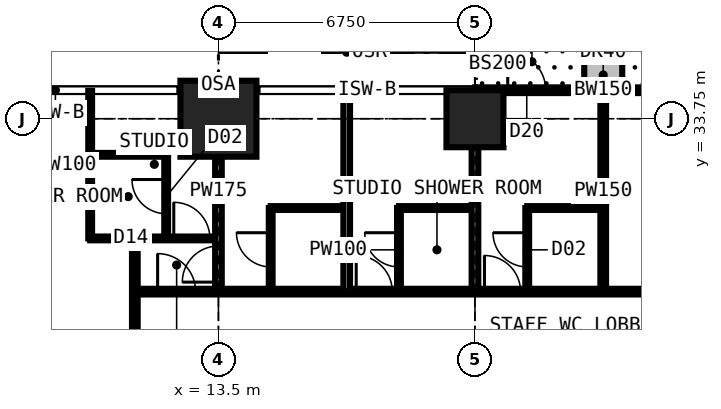
"""IFC4 building model, lengths in metres.
Left out: names, types, materials, properties, quantities, classifications, styles, units other than length and angle.
Written with IfcOpenShell. Run it as: python <this file> out.ifc"""

import sys

from ifc_helpers import new_model, si_unit, direction, frame, frame_2d, origin, origin_2d, place, context, subcontext, project, spatial, rectangle, extrude, element, fill, save


model = new_model("IFC4")
c1 = context("Model", 3, precision=1e-05, world=origin(), true_north=direction((0.0, 1.0)))
c2 = subcontext(c1, "Body", "Model", "MODEL_VIEW")
j1 = project(units=[si_unit("LENGTHUNIT", "METRE"), si_unit("PLANEANGLEUNIT", "RADIAN")], contexts=[c1])
p1 = place(None, origin())
s1 = spatial("IfcSite", under=j1, at=p1, CompositionType="ELEMENT")
p2 = place(p1, origin())
s2 = spatial("IfcBuilding", under=s1, at=p2, CompositionType="ELEMENT")
p3 = place(p2, frame((0.0, 0.0, 134.1)))
s3 = spatial("IfcBuildingStorey", under=s2, at=p3, CompositionType="ELEMENT", Elevation=134.1)
p4 = place(p3, frame((13.5, 33.75, 0.0), z_axis=(0.0, 0.0, 1.0), x_axis=(1.0, 0.0, 0.0)))
e1 = element("IfcColumn", 1, at=p4, inside=s3, PredefinedType="COLUMN", context=c2, shape_type="SweptSolid", body=[
    extrude(rectangle(XDim=2.0, YDim=2.0, at=origin_2d()), origin(), (0.0, 0.0, 1.0), 3.6),
])
p5 = place(p3, frame((20.25, 33.75, 0.0), z_axis=(0.0, 0.0, 1.0), x_axis=(1.0, 0.0, 0.0)))
e2 = element("IfcColumn", 2, at=p5, inside=s3, PredefinedType="COLUMN", context=c2, shape_type="SweptSolid", body=[
    extrude(rectangle(XDim=1.5, YDim=1.5, at=origin_2d()), origin(), (0.0, 0.0, 1.0), 3.6),
])
p6 = place(p3, frame((20.25, 34.5, 0.0), z_axis=(0.0, 0.0, 1.0), x_axis=(1.0, 0.0, 0.0)))
e3 = element("IfcWall", 3, at=p6, inside=s3, PredefinedType="SOLIDWALL", context=c2, shape_type="SweptSolid", body=[
    extrude(rectangle(XDim=6.75, YDim=0.15, at=frame_2d((3.375, 0.0))), origin(), (0.0, 0.0, 1.0), 3.3),
])
p7 = place(p6, frame((0.863, 0.0, 0.0)))
e4 = element("IfcOpeningElement", 4, at=p7, cuts=e3, PredefinedType="OPENING", context=c2, shape_type="SweptSolid", body=[
    extrude(rectangle(XDim=1.0, YDim=2.2, at=frame_2d((0.5, 1.1))), frame((0.0, 0.085, 0.0), z_axis=(0.0, -1.0, 0.0), x_axis=(1.0, 0.0, 0.0)), (0.0, 0.0, 1.0), 0.17),
])
p8 = place(p6, frame((1.975, 0.0, 0.9)))
e5 = element("IfcOpeningElement", 5, at=p8, cuts=e3, PredefinedType="OPENING", context=c2, shape_type="SweptSolid", body=[
    extrude(rectangle(XDim=1.2, YDim=1.8, at=frame_2d((0.6, 0.9))), frame((0.0, 0.085, 0.0), z_axis=(0.0, -1.0, 0.0), x_axis=(1.0, 0.0, 0.0)), (0.0, 0.0, 1.0), 0.17),
])
p9 = place(p6, frame((4.621, 0.0, 0.0)))
e6 = element("IfcOpeningElement", 6, at=p9, cuts=e3, PredefinedType="OPENING", context=c2, shape_type="SweptSolid", body=[
    extrude(rectangle(XDim=1.0, YDim=2.2, at=frame_2d((0.5, 1.1))), frame((0.0, 0.085, 0.0), z_axis=(0.0, -1.0, 0.0), x_axis=(1.0, 0.0, 0.0)), (0.0, 0.0, 1.0), 0.17),
])
p10 = place(p6, frame((3.592, 0.0, 0.9)))
e7 = element("IfcOpeningElement", 7, at=p10, cuts=e3, PredefinedType="OPENING", context=c2, shape_type="SweptSolid", body=[
    extrude(rectangle(XDim=0.9, YDim=1.8, at=frame_2d((0.45, 0.9))), frame((0.0, 0.085, 0.0), z_axis=(0.0, -1.0, 0.0), x_axis=(1.0, 0.0, 0.0)), (0.0, 0.0, 1.0), 0.17),
])
p11 = place(p3, frame((23.625, 34.6, 0.0), z_axis=(0.0, 0.0, 1.0), x_axis=(0.0, 1.0, 0.0)))
e8 = element("IfcWall", 8, at=p11, inside=s3, PredefinedType="USERDEFINED", context=c2, shape_type="SweptSolid", body=[
    extrude(rectangle(XDim=2.2, YDim=1.0, at=frame_2d((1.1, 0.0))), origin(), (0.0, 0.0, 1.0), 0.9),
])
p12 = place(p3, frame((10.125, 30.6, 0.0), z_axis=(0.0, 0.0, 1.0), x_axis=(0.0, 1.0, 0.0)))
e9 = element("IfcWall", 9, at=p12, inside=s3, PredefinedType="PARTITIONING", context=c2, shape_type="SweptSolid", body=[
    extrude(rectangle(XDim=3.884, YDim=0.1, at=frame_2d((1.942, 0.0))), origin(), (0.0, 0.0, 1.0), 3.3),
])
p13 = place(p3, frame((10.125, 30.6, 0.0), z_axis=(0.0, 0.0, 1.0), x_axis=(1.0, 0.0, 0.0)))
e10 = element("IfcWall", 10, at=p13, inside=s3, PredefinedType="PARTITIONING", context=c2, shape_type="SweptSolid", body=[
    extrude(rectangle(XDim=3.375, YDim=0.1, at=frame_2d((1.688, 0.0))), origin(), (0.0, 0.0, 1.0), 3.3),
])
p14 = place(p13, frame((2.2, 0.0, 0.0)))
e11 = element("IfcOpeningElement", 11, at=p14, cuts=e10, PredefinedType="OPENING", context=c2, shape_type="SweptSolid", body=[
    extrude(rectangle(XDim=0.95, YDim=2.2, at=frame_2d((0.475, 1.1))), frame((0.0, 0.06, 0.0), z_axis=(0.0, -1.0, 0.0), x_axis=(1.0, 0.0, 0.0)), (0.0, 0.0, 1.0), 0.12),
])
p15 = place(p3, frame((10.125, 32.8, 0.0), z_axis=(0.0, 0.0, 1.0), x_axis=(1.0, 0.0, 0.0)))
e12 = element("IfcWall", 12, at=p15, inside=s3, PredefinedType="PARTITIONING", context=c2, shape_type="SweptSolid", body=[
    extrude(rectangle(XDim=2.0, YDim=0.1, at=frame_2d((1.0, 0.0))), origin(), (0.0, 0.0, 1.0), 3.3),
])
p16 = place(p3, frame((11.3, 11.3, 0.0), z_axis=(0.0, 0.0, 1.0), x_axis=(0.0, 1.0, 0.0)))
e13 = element("IfcWall", 13, at=p16, inside=s3, PredefinedType="PARTITIONING", context=c2, shape_type="SweptSolid", body=[
    extrude(rectangle(XDim=19.3, YDim=0.15, at=frame_2d((9.65, 0.0))), origin(), (0.0, 0.0, 1.0), 3.3),
])
p17 = place(p16, frame((13.525, 0.0, 0.0)))
e14 = element("IfcOpeningElement", 14, at=p17, cuts=e13, PredefinedType="OPENING", context=c2, shape_type="SweptSolid", body=[
    extrude(rectangle(XDim=1.0, YDim=2.2, at=frame_2d((0.5, 1.1))), frame((0.0, 0.085, 0.0), z_axis=(0.0, -1.0, 0.0), x_axis=(1.0, 0.0, 0.0)), (0.0, 0.0, 1.0), 0.17),
])
p18 = place(p16, frame((10.438, 0.0, 0.0)))
e15 = element("IfcOpeningElement", 15, at=p18, cuts=e13, PredefinedType="OPENING", context=c2, shape_type="SweptSolid", body=[
    extrude(rectangle(XDim=1.0, YDim=2.2, at=frame_2d((0.5, 1.1))), frame((0.0, 0.085, 0.0), z_axis=(0.0, -1.0, 0.0), x_axis=(1.0, 0.0, 0.0)), (0.0, 0.0, 1.0), 0.17),
])
p19 = place(p3, frame((11.3, 29.2, 0.0), z_axis=(0.0, 0.0, 1.0), x_axis=(1.0, 0.0, 0.0)))
e16 = element("IfcWall", 16, at=p19, inside=s3, PredefinedType="PARTITIONING", context=c2, shape_type="SweptSolid", body=[
    extrude(rectangle(XDim=19.075, YDim=0.15, at=frame_2d((9.538, 0.0))), origin(), (0.0, 0.0, 1.0), 3.3),
])
p20 = place(p19, frame((5.825, 0.0, 0.0)))
e17 = element("IfcOpeningElement", 17, at=p20, cuts=e16, PredefinedType="OPENING", context=c2, shape_type="SweptSolid", body=[
    extrude(rectangle(XDim=0.95, YDim=2.2, at=frame_2d((0.475, 1.1))), frame((0.0, 0.085, 0.0), z_axis=(0.0, -1.0, 0.0), x_axis=(1.0, 0.0, 0.0)), (0.0, 0.0, 1.0), 0.17),
])
p21 = place(p19, frame((9.2, 0.0, 0.0)))
e18 = element("IfcOpeningElement", 18, at=p21, cuts=e16, PredefinedType="OPENING", context=c2, shape_type="SweptSolid", body=[
    extrude(rectangle(XDim=0.95, YDim=2.2, at=frame_2d((0.475, 1.1))), frame((0.0, 0.085, 0.0), z_axis=(0.0, -1.0, 0.0), x_axis=(1.0, 0.0, 0.0)), (0.0, 0.0, 1.0), 0.17),
])
p22 = place(p19, frame((0.6, 0.0, 0.0)))
e19 = element("IfcOpeningElement", 19, at=p22, cuts=e16, PredefinedType="OPENING", context=c2, shape_type="SweptSolid", body=[
    extrude(rectangle(XDim=1.0, YDim=2.2, at=frame_2d((0.5, 1.1))), frame((0.0, 0.085, 0.0), z_axis=(0.0, -1.0, 0.0), x_axis=(1.0, 0.0, 0.0)), (0.0, 0.0, 1.0), 0.17),
])
p23 = place(p3, frame((12.125, 30.6, 0.0), z_axis=(0.0, 0.0, 1.0), x_axis=(0.0, 1.0, 0.0)))
e20 = element("IfcWall", 20, at=p23, inside=s3, PredefinedType="PARTITIONING", context=c2, shape_type="SweptSolid", body=[
    extrude(rectangle(XDim=2.2, YDim=0.1, at=frame_2d((1.1, 0.0))), origin(), (0.0, 0.0, 1.0), 3.3),
])
p24 = place(p23, frame((0.65, 0.0, 0.0)))
e21 = element("IfcOpeningElement", 21, at=p24, cuts=e20, PredefinedType="OPENING", context=c2, shape_type="SweptSolid", body=[
    extrude(rectangle(XDim=0.9, YDim=2.2, at=frame_2d((0.45, 1.1))), frame((0.0, 0.06, 0.0), z_axis=(0.0, -1.0, 0.0), x_axis=(1.0, 0.0, 0.0)), (0.0, 0.0, 1.0), 0.12),
])
p25 = place(p3, frame((13.5, 29.2, 0.0), z_axis=(0.0, 0.0, 1.0), x_axis=(0.0, 1.0, 0.0)))
e22 = element("IfcWall", 22, at=p25, inside=s3, PredefinedType="PARTITIONING", context=c2, shape_type="SweptSolid", body=[
    extrude(rectangle(XDim=5.284, YDim=0.175, at=frame_2d((2.642, 0.0))), origin(), (0.0, 0.0, 1.0), 2.731),
])
p26 = place(p25, frame((0.25, 0.0, 0.0)))
e23 = element("IfcOpeningElement", 23, at=p26, cuts=e22, PredefinedType="OPENING", context=c2, shape_type="SweptSolid", body=[
    extrude(rectangle(XDim=0.95, YDim=2.2, at=frame_2d((0.475, 1.1))), frame((0.0, 0.097, 0.0), z_axis=(0.0, -1.0, 0.0), x_axis=(1.0, 0.0, 0.0)), (0.0, 0.0, 1.0), 0.195),
])
p27 = place(p3, frame((14.875, 29.2, 0.0), z_axis=(0.0, 0.0, 1.0), x_axis=(0.0, 1.0, 0.0)))
e24 = element("IfcWall", 24, at=p27, inside=s3, PredefinedType="PARTITIONING", context=c2, shape_type="SweptSolid", body=[
    extrude(rectangle(XDim=2.2, YDim=0.1, at=frame_2d((1.1, 0.0))), origin(), (0.0, 0.0, 1.0), 3.3),
])
p28 = place(p27, frame((0.65, 0.0, 0.0)))
e25 = element("IfcOpeningElement", 25, at=p28, cuts=e24, PredefinedType="OPENING", context=c2, shape_type="SweptSolid", body=[
    extrude(rectangle(XDim=0.9, YDim=2.2, at=frame_2d((0.45, 1.1))), frame((0.0, 0.06, 0.0), z_axis=(0.0, -1.0, 0.0), x_axis=(1.0, 0.0, 0.0)), (0.0, 0.0, 1.0), 0.12),
])
p29 = place(p3, frame((14.875, 31.4, 0.0), z_axis=(0.0, 0.0, 1.0), x_axis=(1.0, 0.0, 0.0)))
e26 = element("IfcWall", 26, at=p29, inside=s3, PredefinedType="PARTITIONING", context=c2, shape_type="SweptSolid", body=[
    extrude(rectangle(XDim=2.0, YDim=0.1, at=frame_2d((1.0, 0.0))), origin(), (0.0, 0.0, 1.0), 3.3),
])
p30 = place(p3, frame((16.875, 29.2, 0.0), z_axis=(0.0, 0.0, 1.0), x_axis=(0.0, 1.0, 0.0)))
e27 = element("IfcWall", 27, at=p30, inside=s3, PredefinedType="PARTITIONING", context=c2, shape_type="SweptSolid", body=[
    extrude(rectangle(XDim=5.284, YDim=0.175, at=frame_2d((2.642, 0.0))), origin(), (0.0, 0.0, 1.0), 3.3),
])
p31 = place(p3, frame((18.25, 29.2, 0.0), z_axis=(0.0, 0.0, 1.0), x_axis=(0.0, 1.0, 0.0)))
e28 = element("IfcWall", 28, at=p31, inside=s3, PredefinedType="PARTITIONING", context=c2, shape_type="SweptSolid", body=[
    extrude(rectangle(XDim=2.2, YDim=0.1, at=frame_2d((1.1, 0.0))), origin(), (0.0, 0.0, 1.0), 3.3),
])
p32 = place(p31, frame((0.65, 0.0, 0.0)))
e29 = element("IfcOpeningElement", 29, at=p32, cuts=e28, PredefinedType="OPENING", context=c2, shape_type="SweptSolid", body=[
    extrude(rectangle(XDim=0.9, YDim=2.2, at=frame_2d((0.45, 1.1))), frame((0.0, 0.06, 0.0), z_axis=(0.0, -1.0, 0.0), x_axis=(1.0, 0.0, 0.0)), (0.0, 0.0, 1.0), 0.12),
])
p33 = place(p3, frame((18.25, 31.4, 0.0), z_axis=(0.0, 0.0, 1.0), x_axis=(1.0, 0.0, 0.0)))
e30 = element("IfcWall", 30, at=p33, inside=s3, PredefinedType="PARTITIONING", context=c2, shape_type="SweptSolid", body=[
    extrude(rectangle(XDim=2.0, YDim=0.1, at=frame_2d((1.0, 0.0))), origin(), (0.0, 0.0, 1.0), 3.3),
])
p34 = place(p3, frame((20.25, 29.2, 0.0), z_axis=(0.0, 0.0, 1.0), x_axis=(0.0, 1.0, 0.0)))
e31 = element("IfcWall", 31, at=p34, inside=s3, PredefinedType="PARTITIONING", context=c2, shape_type="SweptSolid", body=[
    extrude(rectangle(XDim=5.284, YDim=0.175, at=frame_2d((2.642, 0.0))), origin(), (0.0, 0.0, 1.0), 2.802),
])
p35 = place(p3, frame((21.625, 29.2, 0.0), z_axis=(0.0, 0.0, 1.0), x_axis=(0.0, 1.0, 0.0)))
e32 = element("IfcWall", 32, at=p35, inside=s3, PredefinedType="PARTITIONING", context=c2, shape_type="SweptSolid", body=[
    extrude(rectangle(XDim=2.2, YDim=0.1, at=frame_2d((1.1, 0.0))), origin(), (0.0, 0.0, 1.0), 3.3),
])
p36 = place(p35, frame((0.65, 0.0, 0.0)))
e33 = element("IfcOpeningElement", 33, at=p36, cuts=e32, PredefinedType="OPENING", context=c2, shape_type="SweptSolid", body=[
    extrude(rectangle(XDim=0.9, YDim=2.2, at=frame_2d((0.45, 1.1))), frame((0.0, 0.06, 0.0), z_axis=(0.0, -1.0, 0.0), x_axis=(1.0, 0.0, 0.0)), (0.0, 0.0, 1.0), 0.12),
])
p37 = place(p3, frame((21.625, 31.4, 0.0), z_axis=(0.0, 0.0, 1.0), x_axis=(1.0, 0.0, 0.0)))
e34 = element("IfcWall", 34, at=p37, inside=s3, PredefinedType="PARTITIONING", context=c2, shape_type="SweptSolid", body=[
    extrude(rectangle(XDim=2.0, YDim=0.1, at=frame_2d((1.0, 0.0))), origin(), (0.0, 0.0, 1.0), 3.3),
])
p38 = place(p3, frame((23.625, 29.2, 0.0), z_axis=(0.0, 0.0, 1.0), x_axis=(0.0, 1.0, 0.0)))
e35 = element("IfcWall", 35, at=p38, inside=s3, PredefinedType="PARTITIONING", context=c2, shape_type="SweptSolid", body=[
    extrude(rectangle(XDim=5.284, YDim=0.15, at=frame_2d((2.642, 0.0))), origin(), (0.0, 0.0, 1.0), 3.3),
])
p39 = place(p7, origin())
e36 = element("IfcDoor", 36, at=p39, inside=s3, OperationType="SINGLE_SWING_LEFT", PredefinedType="DOOR", context=c2, shape_type="SweptSolid", body=[
    extrude(rectangle(XDim=1.0, YDim=2.2, at=frame_2d((0.5, 1.1))), frame((0.0, 0.025, 0.0), z_axis=(0.0, -1.0, 0.0), x_axis=(1.0, 0.0, 0.0)), (0.0, 0.0, 1.0), 0.05),
])
fill(e4, e36)
p40 = place(p8, origin())
e37 = element("IfcWindow", 37, at=p40, inside=s3, PartitioningType="SINGLE_PANEL", PredefinedType="WINDOW", context=c2, shape_type="SweptSolid", body=[
    extrude(rectangle(XDim=1.2, YDim=1.8, at=frame_2d((0.6, 0.9))), frame((0.0, 0.03, 0.0), z_axis=(0.0, -1.0, 0.0), x_axis=(1.0, 0.0, 0.0)), (0.0, 0.0, 1.0), 0.06),
])
fill(e5, e37)
p41 = place(p10, origin())
e38 = element("IfcWindow", 38, at=p41, inside=s3, PartitioningType="SINGLE_PANEL", PredefinedType="WINDOW", context=c2, shape_type="SweptSolid", body=[
    extrude(rectangle(XDim=0.9, YDim=1.8, at=frame_2d((0.45, 0.9))), frame((0.0, 0.03, 0.0), z_axis=(0.0, -1.0, 0.0), x_axis=(1.0, 0.0, 0.0)), (0.0, 0.0, 1.0), 0.06),
])
fill(e7, e38)
p42 = place(p14, origin())
e39 = element("IfcDoor", 39, at=p42, inside=s3, OperationType="SINGLE_SWING_LEFT", PredefinedType="DOOR", context=c2, shape_type="SweptSolid", body=[
    extrude(rectangle(XDim=0.95, YDim=2.2, at=frame_2d((0.475, 1.1))), frame((0.0, 0.025, 0.0), z_axis=(0.0, -1.0, 0.0), x_axis=(1.0, 0.0, 0.0)), (0.0, 0.0, 1.0), 0.05),
])
fill(e11, e39)
p43 = place(p24, origin())
e40 = element("IfcDoor", 40, at=p43, inside=s3, OperationType="SINGLE_SWING_RIGHT", PredefinedType="DOOR", context=c2, shape_type="SweptSolid", body=[
    extrude(rectangle(XDim=0.9, YDim=2.2, at=frame_2d((0.45, 1.1))), frame((0.0, 0.025, 0.0), z_axis=(0.0, -1.0, 0.0), x_axis=(1.0, 0.0, 0.0)), (0.0, 0.0, 1.0), 0.05),
])
fill(e21, e40)
p44 = place(p26, origin())
e41 = element("IfcDoor", 41, at=p44, inside=s3, OperationType="SINGLE_SWING_LEFT", PredefinedType="DOOR", context=c2, shape_type="SweptSolid", body=[
    extrude(rectangle(XDim=0.95, YDim=2.2, at=frame_2d((0.475, 1.1))), frame((0.0, 0.025, 0.0), z_axis=(0.0, -1.0, 0.0), x_axis=(1.0, 0.0, 0.0)), (0.0, 0.0, 1.0), 0.05),
])
fill(e23, e41)
p45 = place(p28, origin())
e42 = element("IfcDoor", 42, at=p45, inside=s3, OperationType="SINGLE_SWING_RIGHT", PredefinedType="DOOR", context=c2, shape_type="SweptSolid", body=[
    extrude(rectangle(XDim=0.9, YDim=2.2, at=frame_2d((0.45, 1.1))), frame((0.0, 0.025, 0.0), z_axis=(0.0, -1.0, 0.0), x_axis=(1.0, 0.0, 0.0)), (0.0, 0.0, 1.0), 0.05),
])
fill(e25, e42)
p46 = place(p20, origin())
e43 = element("IfcDoor", 43, at=p46, inside=s3, OperationType="SINGLE_SWING_LEFT", PredefinedType="DOOR", context=c2, shape_type="SweptSolid", body=[
    extrude(rectangle(XDim=0.95, YDim=2.2, at=frame_2d((0.475, 1.1))), frame((0.0, 0.025, 0.0), z_axis=(0.0, -1.0, 0.0), x_axis=(1.0, 0.0, 0.0)), (0.0, 0.0, 1.0), 0.05),
])
fill(e17, e43)
p47 = place(p32, origin())
e44 = element("IfcDoor", 44, at=p47, inside=s3, OperationType="SINGLE_SWING_RIGHT", PredefinedType="DOOR", context=c2, shape_type="SweptSolid", body=[
    extrude(rectangle(XDim=0.9, YDim=2.2, at=frame_2d((0.45, 1.1))), frame((0.0, 0.025, 0.0), z_axis=(0.0, -1.0, 0.0), x_axis=(1.0, 0.0, 0.0)), (0.0, 0.0, 1.0), 0.05),
])
fill(e29, e44)
p48 = place(p21, origin())
e45 = element("IfcDoor", 45, at=p48, inside=s3, OperationType="SINGLE_SWING_LEFT", PredefinedType="DOOR", context=c2, shape_type="SweptSolid", body=[
    extrude(rectangle(XDim=0.95, YDim=2.2, at=frame_2d((0.475, 1.1))), frame((0.0, 0.025, 0.0), z_axis=(0.0, -1.0, 0.0), x_axis=(1.0, 0.0, 0.0)), (0.0, 0.0, 1.0), 0.05),
])
fill(e18, e45)
p49 = place(p36, origin())
e46 = element("IfcDoor", 46, at=p49, inside=s3, OperationType="SINGLE_SWING_RIGHT", PredefinedType="DOOR", context=c2, shape_type="SweptSolid", body=[
    extrude(rectangle(XDim=0.9, YDim=2.2, at=frame_2d((0.45, 1.1))), frame((0.0, 0.025, 0.0), z_axis=(0.0, -1.0, 0.0), x_axis=(1.0, 0.0, 0.0)), (0.0, 0.0, 1.0), 0.05),
])
fill(e33, e46)
p50 = place(p22, origin())
e47 = element("IfcDoor", 47, at=p50, inside=s3, OperationType="SINGLE_SWING_LEFT", PredefinedType="DOOR", context=c2, shape_type="SweptSolid", body=[
    extrude(rectangle(XDim=1.0, YDim=2.2, at=frame_2d((0.5, 1.1))), frame((0.0, 0.025, 0.0), z_axis=(0.0, -1.0, 0.0), x_axis=(1.0, 0.0, 0.0)), (0.0, 0.0, 1.0), 0.05),
])
fill(e19, e47)
save(model, sys.argv[1])
